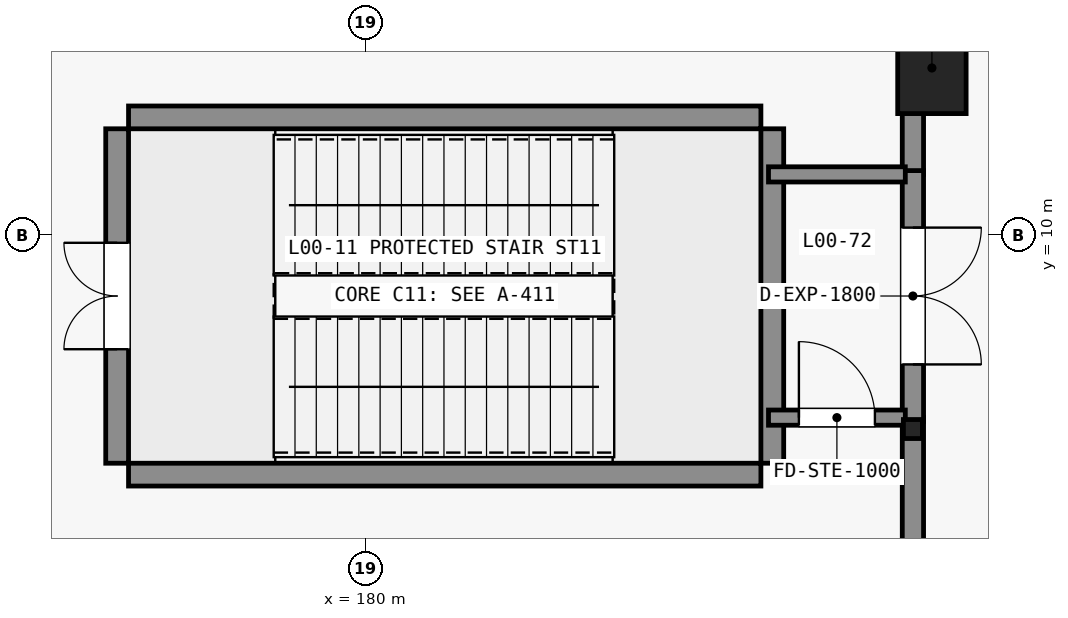
"""IFC4 building model, lengths in metres.
Left out: names, types, materials, properties, quantities, classifications, styles, units other than length and angle.
Written with IfcOpenShell. Run it as: python <this file> out.ifc"""

import sys

from ifc_helpers import new_model, si_unit, direction, frame, frame_2d, origin, origin_2d, place, context, subcontext, project, spatial, rectangle, hollow_rectangle, extrude, element, fill, save


model = new_model("IFC4")
c1 = context("Model", 3, precision=1e-05, world=origin(), true_north=direction((0.0, 1.0)))
c2 = subcontext(c1, "Body", "Model", "MODEL_VIEW")
j1 = project(units=[si_unit("LENGTHUNIT", "METRE"), si_unit("PLANEANGLEUNIT", "RADIAN")], contexts=[c1])
p1 = place(None, origin())
s1 = spatial("IfcSite", under=j1, at=p1, CompositionType="ELEMENT")
p2 = place(p1, origin())
s2 = spatial("IfcBuilding", under=s1, at=p2, CompositionType="ELEMENT")
p3 = place(p2, origin())
s3 = spatial("IfcBuildingStorey", under=s2, at=p3, CompositionType="ELEMENT", Elevation=0.0)
p4 = place(p3, frame((187.45, 12.2, -0.45), z_axis=(0.0, 0.0, 1.0), x_axis=(1.0, 0.0, 0.0)))
e1 = element("IfcColumn", 1, at=p4, inside=s3, PredefinedType="PILASTER", context=c2, shape_type="SweptSolid", body=[
    extrude(rectangle(XDim=0.9, YDim=1.2, at=origin_2d()), origin(), (0.0, 0.0, 1.0), 6.45),
])
p5 = place(p3, frame((187.2, 7.45, -0.45), z_axis=(0.0, 0.0, 1.0), x_axis=(1.0, 0.0, 0.0)))
e2 = element("IfcColumn", 2, at=p5, inside=s3, PredefinedType="COLUMN", context=c2, shape_type="SweptSolid", body=[
    extrude(hollow_rectangle(XDim=0.25, YDim=0.25, WallThickness=0.012, at=origin_2d()), origin(), (0.0, 0.0, 1.0), 6.45),
])
for number, where, z_axis, x_axis in (
    (3, (176.88, 6.85, 0.0), (0.0, 0.0, 1.0), (1.0, 0.0, 0.0)),
    (4, (176.88, 11.55, 0.0), (0.0, 0.0, 1.0), (1.0, 0.0, 0.0)),
):
    element("IfcWall", number, at=place(p3, frame(where, z_axis=z_axis, x_axis=x_axis)), inside=s3, PredefinedType="SHEAR", context=c2, shape_type="SweptSolid", body=[
        extrude(rectangle(XDim=8.32, YDim=0.3, at=frame_2d((4.16, 0.0))), origin(), (0.0, 0.0, 1.0), 6.0),
    ])
p6 = place(p3, frame((176.73, 7.0, 0.0), z_axis=(0.0, 0.0, 1.0), x_axis=(0.0, 1.0, 0.0)))
e5 = element("IfcWall", 5, at=p6, inside=s3, PredefinedType="SHEAR", context=c2, shape_type="SweptSolid", body=[
    extrude(rectangle(XDim=4.4, YDim=0.3, at=frame_2d((2.2, 0.0))), origin(), (0.0, 0.0, 1.0), 6.0),
])
p7 = place(p6, frame((1.5, 0.0, 0.0)))
e6 = element("IfcOpeningElement", 6, at=p7, cuts=e5, PredefinedType="OPENING", context=c2, shape_type="SweptSolid", body=[
    extrude(rectangle(XDim=1.4, YDim=2.2, at=frame_2d((0.7, 1.1))), frame((0.0, 0.16, 0.0), z_axis=(0.0, -1.0, 0.0), x_axis=(1.0, 0.0, 0.0)), (0.0, 0.0, 1.0), 0.32),
])
p8 = place(p3, frame((185.35, 7.0, 0.0), z_axis=(0.0, 0.0, 1.0), x_axis=(0.0, 1.0, 0.0)))
e7 = element("IfcWall", 7, at=p8, inside=s3, PredefinedType="SHEAR", context=c2, shape_type="SweptSolid", body=[
    extrude(rectangle(XDim=4.4, YDim=0.3, at=frame_2d((2.2, 0.0))), origin(), (0.0, 0.0, 1.0), 6.0),
])
p9 = place(p3, frame((187.2, 4.8, 0.0), z_axis=(0.0, 0.0, 1.0), x_axis=(0.0, 1.0, 0.0)))
e8 = element("IfcWall", 8, at=p9, inside=s3, PredefinedType="STANDARD", context=c2, shape_type="SweptSolid", body=[
    extrude(rectangle(XDim=2.8, YDim=0.28, at=frame_2d((1.4, 0.0))), origin(), (0.0, 0.0, 1.0), 4.927),
])
p10 = place(p3, frame((187.2, 10.8, 0.0), z_axis=(0.0, 0.0, 1.0), x_axis=(0.0, 1.0, 0.0)))
e9 = element("IfcWall", 9, at=p10, inside=s3, PredefinedType="STANDARD", context=c2, shape_type="SweptSolid", body=[
    extrude(rectangle(XDim=5.62, YDim=0.28, at=frame_2d((2.81, 0.0))), origin(), (0.0, 0.0, 1.0), 4.927),
])
p11 = place(p10, frame((2.4, 0.0, 0.0)))
e10 = element("IfcOpeningElement", 10, at=p11, cuts=e9, PredefinedType="OPENING", context=c2, shape_type="SweptSolid", body=[
    extrude(rectangle(XDim=2.4, YDim=2.5, at=frame_2d((1.2, 1.25))), frame((0.0, 0.15, 0.0), z_axis=(0.0, -1.0, 0.0), x_axis=(1.0, 0.0, 0.0)), (0.0, 0.0, 1.0), 0.3),
])
p12 = place(p3, frame((187.2, 10.85, 0.0), z_axis=(0.0, 0.0, 1.0), x_axis=(0.0, -1.0, 0.0)))
e11 = element("IfcWall", 11, at=p12, inside=s3, PredefinedType="STANDARD", context=c2, shape_type="SweptSolid", body=[
    extrude(rectangle(XDim=3.3, YDim=0.28, at=frame_2d((1.65, 0.0))), origin(), (0.0, 0.0, 1.0), 5.62),
])
p13 = place(p12, frame((0.75, 0.0, 0.0)))
e12 = element("IfcOpeningElement", 12, at=p13, cuts=e11, PredefinedType="OPENING", context=c2, shape_type="SweptSolid", body=[
    extrude(rectangle(XDim=1.8, YDim=2.25, at=frame_2d((0.9, 1.125))), frame((0.0, 0.15, 0.0), z_axis=(0.0, -1.0, 0.0), x_axis=(1.0, 0.0, 0.0)), (0.0, 0.0, 1.0), 0.3),
])
p14 = place(p3, frame((185.3, 7.6, 0.0), z_axis=(0.0, 0.0, 1.0), x_axis=(1.0, 0.0, 0.0)))
e13 = element("IfcWall", 13, at=p14, inside=s3, PredefinedType="STANDARD", context=c2, shape_type="SweptSolid", body=[
    extrude(rectangle(XDim=1.8, YDim=0.2, at=frame_2d((0.9, 0.0))), origin(), (0.0, 0.0, 1.0), 4.927),
])
p15 = place(p14, frame((0.4, 0.0, 0.0)))
e14 = element("IfcOpeningElement", 14, at=p15, cuts=e13, PredefinedType="OPENING", context=c2, shape_type="SweptSolid", body=[
    extrude(rectangle(XDim=1.0, YDim=2.15, at=frame_2d((0.5, 1.075))), frame((0.0, 0.11, 0.0), z_axis=(0.0, -1.0, 0.0), x_axis=(1.0, 0.0, 0.0)), (0.0, 0.0, 1.0), 0.22),
])
p16 = place(p3, frame((185.3, 10.8, 0.0), z_axis=(0.0, 0.0, 1.0), x_axis=(1.0, 0.0, 0.0)))
e15 = element("IfcWall", 15, at=p16, inside=s3, PredefinedType="STANDARD", context=c2, shape_type="SweptSolid", body=[
    extrude(rectangle(XDim=1.8, YDim=0.2, at=frame_2d((0.9, 0.0))), origin(), (0.0, 0.0, 1.0), 4.927),
])
p17 = place(p7, origin())
e16 = element("IfcDoor", 16, at=p17, inside=s3, OperationType="DOUBLE_DOOR_SINGLE_SWING", PredefinedType="DOOR", context=c2, shape_type="SweptSolid", body=[
    extrude(rectangle(XDim=1.4, YDim=2.2, at=frame_2d((0.7, 1.1))), frame((0.0, 0.025, 0.0), z_axis=(0.0, -1.0, 0.0), x_axis=(1.0, 0.0, 0.0)), (0.0, 0.0, 1.0), 0.05),
])
fill(e6, e16)
p18 = place(p13, origin())
e17 = element("IfcDoor", 17, at=p18, inside=s3, OperationType="DOUBLE_DOOR_SINGLE_SWING", PredefinedType="DOOR", context=c2, shape_type="SweptSolid", body=[
    extrude(rectangle(XDim=1.8, YDim=2.25, at=frame_2d((0.9, 1.125))), frame((0.0, 0.025, 0.0), z_axis=(0.0, -1.0, 0.0), x_axis=(1.0, 0.0, 0.0)), (0.0, 0.0, 1.0), 0.05),
])
fill(e12, e17)
p19 = place(p15, origin())
e18 = element("IfcDoor", 18, at=p19, inside=s3, OperationType="SINGLE_SWING_LEFT", PredefinedType="DOOR", context=c2, shape_type="SweptSolid", body=[
    extrude(rectangle(XDim=1.0, YDim=2.15, at=frame_2d((0.5, 1.075))), frame((0.0, 0.025, 0.0), z_axis=(0.0, -1.0, 0.0), x_axis=(1.0, 0.0, 0.0)), (0.0, 0.0, 1.0), 0.05),
])
fill(e14, e18)
save(model, sys.argv[1])
